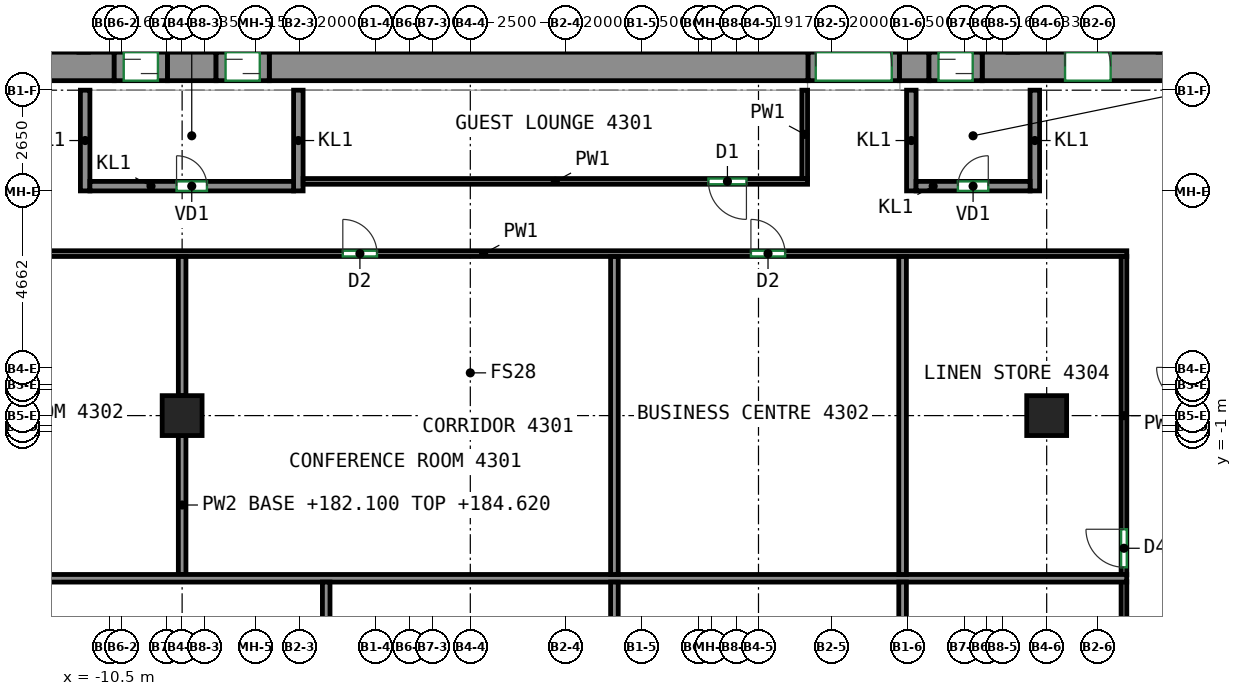
"""IFC4 building model, lengths in metres.
Left out: names, types, materials, properties, quantities, classifications, styles, units other than length and angle.
Written with IfcOpenShell. Run it as: python <this file> out.ifc"""

import sys

from ifc_helpers import new_model, si_unit, direction, frame, frame_2d, origin, origin_2d, place, context, subcontext, project, spatial, rectangle, extrude, source, transform, mapped, element, fill, save


model = new_model("IFC4")
c1 = context("Model", 3, precision=1e-05, world=origin(), true_north=direction((0.0, 1.0)))
c2 = subcontext(c1, "Body", "Model", "MODEL_VIEW")
j1 = project(units=[si_unit("LENGTHUNIT", "METRE"), si_unit("PLANEANGLEUNIT", "RADIAN")], contexts=[c1])
p1 = place(None, origin())
s1 = spatial("IfcSite", under=j1, at=p1, CompositionType="ELEMENT")
p2 = place(p1, origin())
s2 = spatial("IfcBuilding", under=s1, at=p2, CompositionType="ELEMENT")
p3 = place(p2, frame((0.0, 0.0, 182.1)))
s3 = spatial("IfcBuildingStorey", under=s2, at=p3, CompositionType="ELEMENT", Elevation=182.1)
m1 = source(origin(), c2, "Body", "SweptSolid", [
    extrude(rectangle(XDim=1.05, YDim=1.05, at=origin_2d()), origin(), (0.0, 0.0, 1.0), 3.12),
])
for number, where, z_axis, x_axis in (
    (1, (-8.583, -0.562, 0.0), (0.0, 0.0, 1.0), (1.0, 0.0, 0.0)),
    (2, (14.167, -0.562, 0.0), (0.0, 0.0, 1.0), (1.0, 0.0, 0.0)),
):
    element("IfcColumn", number, at=place(p3, frame(where, z_axis=z_axis, x_axis=x_axis)), inside=s3, PredefinedType="COLUMN", context=c2, shape_type="MappedRepresentation", body=[
        mapped(m1, transform((0.0, 0.0, 0.0))),
    ])
m2 = source(origin(), c2, "Body", "SweptSolid", [
    extrude(rectangle(XDim=5.38, YDim=0.75, at=frame_2d((2.69, 0.0))), origin(), (0.0, 0.0, 1.0), 3.12),
])
p4 = place(p3, frame((-15.75, 8.625, 0.0), z_axis=(0.0, 0.0, 1.0), x_axis=(1.0, 0.0, 0.0)))
e3 = element("IfcWall", 3, at=p4, inside=s3, PredefinedType="SHEAR", context=c2, shape_type="MappedRepresentation", body=[
    mapped(m2, transform((0.0, 0.0, 0.0))),
])
p5 = place(p4, frame((2.0, 0.0, 0.0)))
e4 = element("IfcOpeningElement", 4, at=p5, cuts=e3, PredefinedType="OPENING", context=c2, shape_type="SweptSolid", body=[
    extrude(rectangle(XDim=1.2, YDim=2.1, at=frame_2d((0.6, 1.05))), frame((0.0, 0.385, 0.0), z_axis=(0.0, -1.0, 0.0), x_axis=(1.0, 0.0, 0.0)), (0.0, 0.0, 1.0), 0.77),
])
m3 = source(origin(), c2, "Body", "SweptSolid", [
    extrude(rectangle(XDim=1.28, YDim=0.75, at=frame_2d((0.64, 0.0))), origin(), (0.0, 0.0, 1.0), 3.12),
])
p6 = place(p3, frame((-8.97, 8.625, 0.0), z_axis=(0.0, 0.0, 1.0), x_axis=(1.0, 0.0, 0.0)))
e5 = element("IfcWall", 5, at=p6, inside=s3, PredefinedType="SHEAR", context=c2, shape_type="MappedRepresentation", body=[
    mapped(m3, transform((0.0, 0.0, 0.0))),
])
m4 = source(origin(), c2, "Body", "SweptSolid", [
    extrude(rectangle(XDim=14.18, YDim=0.75, at=frame_2d((7.09, 0.0))), origin(), (0.0, 0.0, 1.0), 3.12),
])
p7 = place(p3, frame((-6.29, 8.625, 0.0), z_axis=(0.0, 0.0, 1.0), x_axis=(1.0, 0.0, 0.0)))
e6 = element("IfcWall", 6, at=p7, inside=s3, PredefinedType="SHEAR", context=c2, shape_type="MappedRepresentation", body=[
    mapped(m4, transform((0.0, 0.0, 0.0))),
])
m5 = source(origin(), c2, "Body", "SweptSolid", [
    extrude(rectangle(XDim=0.78, YDim=0.75, at=frame_2d((0.39, 0.0))), origin(), (0.0, 0.0, 1.0), 3.12),
])
p8 = place(p3, frame((10.29, 8.625, 0.0), z_axis=(0.0, 0.0, 1.0), x_axis=(1.0, 0.0, 0.0)))
e7 = element("IfcWall", 7, at=p8, inside=s3, PredefinedType="SHEAR", context=c2, shape_type="MappedRepresentation", body=[
    mapped(m5, transform((0.0, 0.0, 0.0))),
])
m6 = source(origin(), c2, "Body", "SweptSolid", [
    extrude(rectangle(XDim=5.38, YDim=0.75, at=frame_2d((2.69, 0.0))), origin(), (0.0, 0.0, 1.0), 3.12),
])
p9 = place(p3, frame((12.47, 8.625, 0.0), z_axis=(0.0, 0.0, 1.0), x_axis=(1.0, 0.0, 0.0)))
e8 = element("IfcWall", 8, at=p9, inside=s3, PredefinedType="SHEAR", context=c2, shape_type="MappedRepresentation", body=[
    mapped(m6, transform((0.0, 0.0, 0.0))),
])
p10 = place(p9, frame((2.18, 0.0, 0.0)))
e9 = element("IfcOpeningElement", 9, at=p10, cuts=e8, PredefinedType="OPENING", context=c2, shape_type="SweptSolid", body=[
    extrude(rectangle(XDim=1.2, YDim=2.1, at=frame_2d((0.6, 1.05))), frame((0.0, 0.385, 0.0), z_axis=(0.0, -1.0, 0.0), x_axis=(1.0, 0.0, 0.0)), (0.0, 0.0, 1.0), 0.77),
])
m7 = source(origin(), c2, "Body", "SweptSolid", [
    extrude(rectangle(XDim=2.65, YDim=0.25, at=frame_2d((1.325, 0.0))), origin(), (0.0, 0.0, 1.0), 3.12),
])
for number, where, z_axis, x_axis in (
    (10, (-11.135, 5.35, 0.0), (0.0, 0.0, 1.0), (0.0, 1.0, 0.0)),
    (11, (-5.525, 5.35, 0.0), (0.0, 0.0, 1.0), (0.0, 1.0, 0.0)),
):
    element("IfcWall", number, at=place(p3, frame(where, z_axis=z_axis, x_axis=x_axis)), inside=s3, PredefinedType="PARTITIONING", context=c2, shape_type="MappedRepresentation", body=[
        mapped(m7, transform((0.0, 0.0, 0.0))),
    ])
m8 = source(origin(), c2, "Body", "SweptSolid", [
    extrude(rectangle(XDim=5.36, YDim=0.25, at=frame_2d((2.68, 0.0))), origin(), (0.0, 0.0, 1.0), 3.12),
])
p11 = place(p3, frame((-11.01, 5.475, 0.0), z_axis=(0.0, 0.0, 1.0), x_axis=(1.0, 0.0, 0.0)))
e12 = element("IfcWall", 12, at=p11, inside=s3, PredefinedType="PARTITIONING", context=c2, shape_type="MappedRepresentation", body=[
    mapped(m8, transform((0.0, 0.0, 0.0))),
])
p12 = place(p11, frame((2.28, 0.0, 0.0)))
e13 = element("IfcOpeningElement", 13, at=p12, cuts=e12, PredefinedType="OPENING", context=c2, shape_type="SweptSolid", body=[
    extrude(rectangle(XDim=0.8, YDim=2.0, at=frame_2d((0.4, 1.0))), frame((0.0, 0.135, 0.0), z_axis=(0.0, -1.0, 0.0), x_axis=(1.0, 0.0, 0.0)), (0.0, 0.0, 1.0), 0.27),
])
for number, where, z_axis, x_axis in (
    (14, (10.605, 5.35, 0.0), (0.0, 0.0, 1.0), (0.0, 1.0, 0.0)),
    (15, (13.855, 5.35, 0.0), (0.0, 0.0, 1.0), (0.0, 1.0, 0.0)),
):
    element("IfcWall", number, at=place(p3, frame(where, z_axis=z_axis, x_axis=x_axis)), inside=s3, PredefinedType="PARTITIONING", context=c2, shape_type="MappedRepresentation", body=[
        mapped(m7, transform((0.0, 0.0, 0.0))),
    ])
m9 = source(origin(), c2, "Body", "SweptSolid", [
    extrude(rectangle(XDim=3.0, YDim=0.25, at=frame_2d((1.5, 0.0))), origin(), (0.0, 0.0, 1.0), 3.12),
])
p13 = place(p3, frame((10.73, 5.475, 0.0), z_axis=(0.0, 0.0, 1.0), x_axis=(1.0, 0.0, 0.0)))
e16 = element("IfcWall", 16, at=p13, inside=s3, PredefinedType="PARTITIONING", context=c2, shape_type="MappedRepresentation", body=[
    mapped(m9, transform((0.0, 0.0, 0.0))),
])
p14 = place(p13, frame((1.1, 0.0, 0.0)))
e17 = element("IfcOpeningElement", 17, at=p14, cuts=e16, PredefinedType="OPENING", context=c2, shape_type="SweptSolid", body=[
    extrude(rectangle(XDim=0.8, YDim=2.0, at=frame_2d((0.4, 1.0))), frame((0.0, 0.135, 0.0), z_axis=(0.0, -1.0, 0.0), x_axis=(1.0, 0.0, 0.0)), (0.0, 0.0, 1.0), 0.27),
])
m10 = source(origin(), c2, "Body", "SweptSolid", [
    extrude(rectangle(XDim=1.4, YDim=0.75, at=frame_2d((0.7, 0.0))), origin(), (0.0, 0.0, 1.0), 2.7),
])
p15 = place(p3, frame((-10.37, 8.625, 0.0), z_axis=(0.0, 0.0, 1.0), x_axis=(1.0, 0.0, 0.0)))
e18 = element("IfcWall", 18, at=p15, inside=s3, PredefinedType="PARTITIONING", context=c2, shape_type="MappedRepresentation", body=[
    mapped(m10, transform((0.0, 0.0, 0.0))),
])
p16 = place(p15, frame((0.25, 0.0, 0.0)))
e19 = element("IfcOpeningElement", 19, at=p16, cuts=e18, PredefinedType="OPENING", context=c2, shape_type="SweptSolid", body=[
    extrude(rectangle(XDim=0.9, YDim=2.1, at=frame_2d((0.45, 1.05))), frame((0.0, 0.385, 0.0), z_axis=(0.0, -1.0, 0.0), x_axis=(1.0, 0.0, 0.0)), (0.0, 0.0, 1.0), 0.77),
])
m11 = source(origin(), c2, "Body", "SweptSolid", [
    extrude(rectangle(XDim=1.4, YDim=0.75, at=frame_2d((0.7, 0.0))), origin(), (0.0, 0.0, 1.0), 2.7),
])
p17 = place(p3, frame((-7.69, 8.625, 0.0), z_axis=(0.0, 0.0, 1.0), x_axis=(1.0, 0.0, 0.0)))
e20 = element("IfcWall", 20, at=p17, inside=s3, PredefinedType="PARTITIONING", context=c2, shape_type="MappedRepresentation", body=[
    mapped(m11, transform((0.0, 0.0, 0.0))),
])
p18 = place(p17, frame((0.25, 0.0, 0.0)))
e21 = element("IfcOpeningElement", 21, at=p18, cuts=e20, PredefinedType="OPENING", context=c2, shape_type="SweptSolid", body=[
    extrude(rectangle(XDim=0.9, YDim=2.1, at=frame_2d((0.45, 1.05))), frame((0.0, 0.385, 0.0), z_axis=(0.0, -1.0, 0.0), x_axis=(1.0, 0.0, 0.0)), (0.0, 0.0, 1.0), 0.77),
])
m12 = source(origin(), c2, "Body", "SweptSolid", [
    extrude(rectangle(XDim=2.4, YDim=0.75, at=frame_2d((1.2, 0.0))), origin(), (0.0, 0.0, 1.0), 2.7),
])
p19 = place(p3, frame((7.89, 8.625, 0.0), z_axis=(0.0, 0.0, 1.0), x_axis=(1.0, 0.0, 0.0)))
e22 = element("IfcWall", 22, at=p19, inside=s3, PredefinedType="PARTITIONING", context=c2, shape_type="MappedRepresentation", body=[
    mapped(m12, transform((0.0, 0.0, 0.0))),
])
p20 = place(p19, frame((0.2, 0.0, 0.0)))
e23 = element("IfcOpeningElement", 23, at=p20, cuts=e22, PredefinedType="OPENING", context=c2, shape_type="SweptSolid", body=[
    extrude(rectangle(XDim=2.0, YDim=2.1, at=frame_2d((1.0, 1.05))), frame((0.0, 0.385, 0.0), z_axis=(0.0, -1.0, 0.0), x_axis=(1.0, 0.0, 0.0)), (0.0, 0.0, 1.0), 0.77),
])
p21 = place(p3, frame((11.07, 8.625, 0.0), z_axis=(0.0, 0.0, 1.0), x_axis=(1.0, 0.0, 0.0)))
e24 = element("IfcWall", 24, at=p21, inside=s3, PredefinedType="PARTITIONING", context=c2, shape_type="MappedRepresentation", body=[
    mapped(m11, transform((0.0, 0.0, 0.0))),
])
p22 = place(p21, frame((0.25, 0.0, 0.0)))
e25 = element("IfcOpeningElement", 25, at=p22, cuts=e24, PredefinedType="OPENING", context=c2, shape_type="SweptSolid", body=[
    extrude(rectangle(XDim=0.9, YDim=2.1, at=frame_2d((0.45, 1.05))), frame((0.0, 0.385, 0.0), z_axis=(0.0, -1.0, 0.0), x_axis=(1.0, 0.0, 0.0)), (0.0, 0.0, 1.0), 0.77),
])
p23 = place(p3, frame((7.875, 5.6, 0.0), z_axis=(0.0, 0.0, 1.0), x_axis=(-1.0, 0.0, 0.0)))
e26 = element("IfcWall", 26, at=p23, inside=s3, PredefinedType="PARTITIONING", context=c2, shape_type="SweptSolid", body=[
    extrude(rectangle(XDim=13.275, YDim=0.15, at=frame_2d((6.637, 0.0))), origin(), (0.0, 0.0, 1.0), 3.12),
])
p24 = place(p23, frame((1.609, 0.0, 0.0)))
e27 = element("IfcOpeningElement", 27, at=p24, cuts=e26, PredefinedType="OPENING", context=c2, shape_type="SweptSolid", body=[
    extrude(rectangle(XDim=1.0, YDim=2.1, at=frame_2d((0.5, 1.05))), frame((0.0, 0.085, 0.0), z_axis=(0.0, -1.0, 0.0), x_axis=(1.0, 0.0, 0.0)), (0.0, 0.0, 1.0), 0.17),
])
p25 = place(p3, frame((7.8, 8.0, 0.0), z_axis=(0.0, 0.0, 1.0), x_axis=(0.0, -1.0, 0.0)))
e28 = element("IfcWall", 28, at=p25, inside=s3, PredefinedType="PARTITIONING", context=c2, shape_type="SweptSolid", body=[
    extrude(rectangle(XDim=2.325, YDim=0.15, at=frame_2d((1.163, 0.0))), origin(), (0.0, 0.0, 1.0), 3.12),
])
p26 = place(p3, frame((-17.575, 3.7, 0.0), z_axis=(0.0, 0.0, 1.0), x_axis=(1.0, 0.0, 0.0)))
e29 = element("IfcWall", 29, at=p26, inside=s3, PredefinedType="PARTITIONING", context=c2, shape_type="SweptSolid", body=[
    extrude(rectangle(XDim=33.85, YDim=0.15, at=frame_2d((16.925, 0.0))), origin(), (0.0, 0.0, 1.0), 3.12),
])
p27 = place(p26, frame((4.201, 0.0, 0.0)))
e30 = element("IfcOpeningElement", 30, at=p27, cuts=e29, PredefinedType="OPENING", context=c2, shape_type="SweptSolid", body=[
    extrude(rectangle(XDim=0.9, YDim=2.1, at=frame_2d((0.45, 1.05))), frame((0.0, 0.085, 0.0), z_axis=(0.0, -1.0, 0.0), x_axis=(1.0, 0.0, 0.0)), (0.0, 0.0, 1.0), 0.17),
])
p28 = place(p26, frame((13.22, 0.0, 0.0)))
e31 = element("IfcOpeningElement", 31, at=p28, cuts=e29, PredefinedType="OPENING", context=c2, shape_type="SweptSolid", body=[
    extrude(rectangle(XDim=0.9, YDim=2.1, at=frame_2d((0.45, 1.05))), frame((0.0, 0.085, 0.0), z_axis=(0.0, -1.0, 0.0), x_axis=(1.0, 0.0, 0.0)), (0.0, 0.0, 1.0), 0.17),
])
p29 = place(p26, frame((23.959, 0.0, 0.0)))
e32 = element("IfcOpeningElement", 32, at=p29, cuts=e29, PredefinedType="OPENING", context=c2, shape_type="SweptSolid", body=[
    extrude(rectangle(XDim=0.9, YDim=2.1, at=frame_2d((0.45, 1.05))), frame((0.0, 0.085, 0.0), z_axis=(0.0, -1.0, 0.0), x_axis=(1.0, 0.0, 0.0)), (0.0, 0.0, 1.0), 0.17),
])
p30 = place(p3, frame((16.2, -4.753, 0.0), z_axis=(0.0, 0.0, 1.0), x_axis=(0.0, 1.0, 0.0)))
e33 = element("IfcWall", 33, at=p30, inside=s3, PredefinedType="PARTITIONING", context=c2, shape_type="SweptSolid", body=[
    extrude(rectangle(XDim=8.378, YDim=0.15, at=frame_2d((4.189, 0.0))), origin(), (0.0, 0.0, 1.0), 3.12),
])
p31 = place(p30, frame((0.2, 0.0, 0.0)))
e34 = element("IfcOpeningElement", 34, at=p31, cuts=e33, PredefinedType="OPENING", context=c2, shape_type="SweptSolid", body=[
    extrude(rectangle(XDim=1.0, YDim=2.1, at=frame_2d((0.5, 1.05))), frame((0.0, 0.085, 0.0), z_axis=(0.0, -1.0, 0.0), x_axis=(1.0, 0.0, 0.0)), (0.0, 0.0, 1.0), 0.17),
])
p32 = place(p3, frame((16.2, -15.425, 0.0), z_axis=(0.0, 0.0, 1.0), x_axis=(0.0, 1.0, 0.0)))
e35 = element("IfcWall", 35, at=p32, inside=s3, PredefinedType="PARTITIONING", context=c2, shape_type="SweptSolid", body=[
    extrude(rectangle(XDim=10.492, YDim=0.15, at=frame_2d((5.246, 0.0))), origin(), (0.0, 0.0, 1.0), 3.12),
])
p33 = place(p32, frame((1.614, 0.0, 0.0)))
e36 = element("IfcOpeningElement", 36, at=p33, cuts=e35, PredefinedType="OPENING", context=c2, shape_type="SweptSolid", body=[
    extrude(rectangle(XDim=0.9, YDim=2.1, at=frame_2d((0.45, 1.05))), frame((0.0, 0.085, 0.0), z_axis=(0.0, -1.0, 0.0), x_axis=(1.0, 0.0, 0.0)), (0.0, 0.0, 1.0), 0.17),
])
p34 = place(p3, frame((-8.583, -0.037, 0.0), z_axis=(0.0, 0.0, 1.0), x_axis=(0.0, 1.0, 0.0)))
e37 = element("IfcWall", 37, at=p34, inside=s3, PredefinedType="PARTITIONING", context=c2, shape_type="SweptSolid", body=[
    extrude(rectangle(XDim=3.66, YDim=0.2, at=frame_2d((1.83, 0.0))), origin(), (0.0, 0.0, 1.0), 3.12),
])
p35 = place(p3, frame((-8.583, -4.743, 0.0), z_axis=(0.0, 0.0, 1.0), x_axis=(0.0, 1.0, 0.0)))
e38 = element("IfcWall", 38, at=p35, inside=s3, PredefinedType="PARTITIONING", context=c2, shape_type="SweptSolid", body=[
    extrude(rectangle(XDim=3.656, YDim=0.2, at=frame_2d((1.828, 0.0))), origin(), (0.0, 0.0, 1.0), 2.52),
])
p36 = place(p3, frame((-13.873, -4.843, 0.0), z_axis=(0.0, 0.0, 1.0), x_axis=(1.0, 0.0, 0.0)))
e39 = element("IfcWall", 39, at=p36, inside=s3, PredefinedType="PARTITIONING", context=c2, shape_type="SweptSolid", body=[
    extrude(rectangle(XDim=30.146, YDim=0.2, at=frame_2d((15.073, 0.0))), origin(), (0.0, 0.0, 1.0), 3.12),
])
for number, where, z_axis, x_axis in (
    (40, (2.792, -4.743, 0.0), (0.0, 0.0, 1.0), (0.0, 1.0, 0.0)),
    (41, (10.375, -4.743, 0.0), (0.0, 0.0, 1.0), (0.0, 1.0, 0.0)),
):
    element("IfcWall", number, at=place(p3, frame(where, z_axis=z_axis, x_axis=x_axis)), inside=s3, PredefinedType="PARTITIONING", context=c2, shape_type="SweptSolid", body=[
        extrude(rectangle(XDim=8.366, YDim=0.2, at=frame_2d((4.183, 0.0))), origin(), (0.0, 0.0, 1.0), 3.12),
    ])
for number, where, z_axis, x_axis in (
    (42, (-4.792, -15.423, 0.0), (0.0, 0.0, 1.0), (0.0, 1.0, 0.0)),
    (43, (2.792, -15.423, 0.0), (0.0, 0.0, 1.0), (0.0, 1.0, 0.0)),
    (44, (10.375, -15.423, 0.0), (0.0, 0.0, 1.0), (0.0, 1.0, 0.0)),
):
    element("IfcWall", number, at=place(p3, frame(where, z_axis=z_axis, x_axis=x_axis)), inside=s3, PredefinedType="PARTITIONING", context=c2, shape_type="SweptSolid", body=[
        extrude(rectangle(XDim=10.48, YDim=0.2, at=frame_2d((5.24, 0.0))), origin(), (0.0, 0.0, 1.0), 3.12),
    ])
p37 = place(p20, origin())
e45 = element("IfcDoor", 45, at=p37, inside=s3, OperationType="DOUBLE_DOOR_SINGLE_SWING", PredefinedType="DOOR", context=c2, shape_type="SweptSolid", body=[
    extrude(rectangle(XDim=2.0, YDim=2.1, at=frame_2d((1.0, 1.05))), frame((0.0, 0.28, 0.0), z_axis=(0.0, -1.0, 0.0), x_axis=(1.0, 0.0, 0.0)), (0.0, 0.0, 1.0), 0.05),
])
fill(e23, e45)
p38 = place(p12, origin())
e46 = element("IfcDoor", 46, at=p38, inside=s3, OperationType="SINGLE_SWING_LEFT", PredefinedType="DOOR", context=c2, shape_type="SweptSolid", body=[
    extrude(rectangle(XDim=0.8, YDim=2.0, at=frame_2d((0.4, 1.0))), frame((0.0, 0.025, 0.0), z_axis=(0.0, -1.0, 0.0), x_axis=(1.0, 0.0, 0.0)), (0.0, 0.0, 1.0), 0.05),
])
fill(e13, e46)
p39 = place(p14, origin())
e47 = element("IfcDoor", 47, at=p39, inside=s3, OperationType="SINGLE_SWING_RIGHT", PredefinedType="DOOR", context=c2, shape_type="SweptSolid", body=[
    extrude(rectangle(XDim=0.8, YDim=2.0, at=frame_2d((0.4, 1.0))), frame((0.0, 0.025, 0.0), z_axis=(0.0, -1.0, 0.0), x_axis=(1.0, 0.0, 0.0)), (0.0, 0.0, 1.0), 0.05),
])
fill(e17, e47)
p40 = place(p16, origin())
e48 = element("IfcDoor", 48, at=p40, inside=s3, OperationType="SLIDING_TO_LEFT", PredefinedType="DOOR", context=c2, shape_type="SweptSolid", body=[
    extrude(rectangle(XDim=0.9, YDim=2.1, at=frame_2d((0.45, 1.05))), frame((0.0, 0.28, 0.0), z_axis=(0.0, -1.0, 0.0), x_axis=(1.0, 0.0, 0.0)), (0.0, 0.0, 1.0), 0.05),
])
fill(e19, e48)
p41 = place(p18, origin())
e49 = element("IfcDoor", 49, at=p41, inside=s3, OperationType="SLIDING_TO_RIGHT", PredefinedType="DOOR", context=c2, shape_type="SweptSolid", body=[
    extrude(rectangle(XDim=0.9, YDim=2.1, at=frame_2d((0.45, 1.05))), frame((0.0, 0.28, 0.0), z_axis=(0.0, -1.0, 0.0), x_axis=(1.0, 0.0, 0.0)), (0.0, 0.0, 1.0), 0.05),
])
fill(e21, e49)
p42 = place(p22, origin())
e50 = element("IfcDoor", 50, at=p42, inside=s3, OperationType="SLIDING_TO_LEFT", PredefinedType="DOOR", context=c2, shape_type="SweptSolid", body=[
    extrude(rectangle(XDim=0.9, YDim=2.1, at=frame_2d((0.45, 1.05))), frame((0.0, 0.28, 0.0), z_axis=(0.0, -1.0, 0.0), x_axis=(1.0, 0.0, 0.0)), (0.0, 0.0, 1.0), 0.05),
])
fill(e25, e50)
p43 = place(p10, origin())
e51 = element("IfcDoor", 51, at=p43, inside=s3, OperationType="DOUBLE_DOOR_SINGLE_SWING", PredefinedType="DOOR", context=c2, shape_type="SweptSolid", body=[
    extrude(rectangle(XDim=1.2, YDim=2.1, at=frame_2d((0.6, 1.05))), frame((0.0, 0.28, 0.0), z_axis=(0.0, -1.0, 0.0), x_axis=(1.0, 0.0, 0.0)), (0.0, 0.0, 1.0), 0.05),
])
fill(e9, e51)
p44 = place(p31, origin())
e52 = element("IfcDoor", 52, at=p44, inside=s3, OperationType="SINGLE_SWING_RIGHT", PredefinedType="DOOR", context=c2, shape_type="SweptSolid", body=[
    extrude(rectangle(XDim=1.0, YDim=2.1, at=frame_2d((0.5, 1.05))), frame((0.0, 0.025, 0.0), z_axis=(0.0, -1.0, 0.0), x_axis=(1.0, 0.0, 0.0)), (0.0, 0.0, 1.0), 0.05),
])
fill(e34, e52)
p45 = place(p28, origin())
e53 = element("IfcDoor", 53, at=p45, inside=s3, OperationType="SINGLE_SWING_LEFT", PredefinedType="DOOR", context=c2, shape_type="SweptSolid", body=[
    extrude(rectangle(XDim=0.9, YDim=2.1, at=frame_2d((0.45, 1.05))), frame((0.0, 0.025, 0.0), z_axis=(0.0, -1.0, 0.0), x_axis=(1.0, 0.0, 0.0)), (0.0, 0.0, 1.0), 0.05),
])
fill(e31, e53)
p46 = place(p29, origin())
e54 = element("IfcDoor", 54, at=p46, inside=s3, OperationType="SINGLE_SWING_LEFT", PredefinedType="DOOR", context=c2, shape_type="SweptSolid", body=[
    extrude(rectangle(XDim=0.9, YDim=2.1, at=frame_2d((0.45, 1.05))), frame((0.0, 0.025, 0.0), z_axis=(0.0, -1.0, 0.0), x_axis=(1.0, 0.0, 0.0)), (0.0, 0.0, 1.0), 0.05),
])
fill(e32, e54)
p47 = place(p24, origin())
e55 = element("IfcDoor", 55, at=p47, inside=s3, OperationType="SINGLE_SWING_LEFT", PredefinedType="DOOR", context=c2, shape_type="SweptSolid", body=[
    extrude(rectangle(XDim=1.0, YDim=2.1, at=frame_2d((0.5, 1.05))), frame((0.0, 0.025, 0.0), z_axis=(0.0, -1.0, 0.0), x_axis=(1.0, 0.0, 0.0)), (0.0, 0.0, 1.0), 0.05),
])
fill(e27, e55)
save(model, sys.argv[1])
